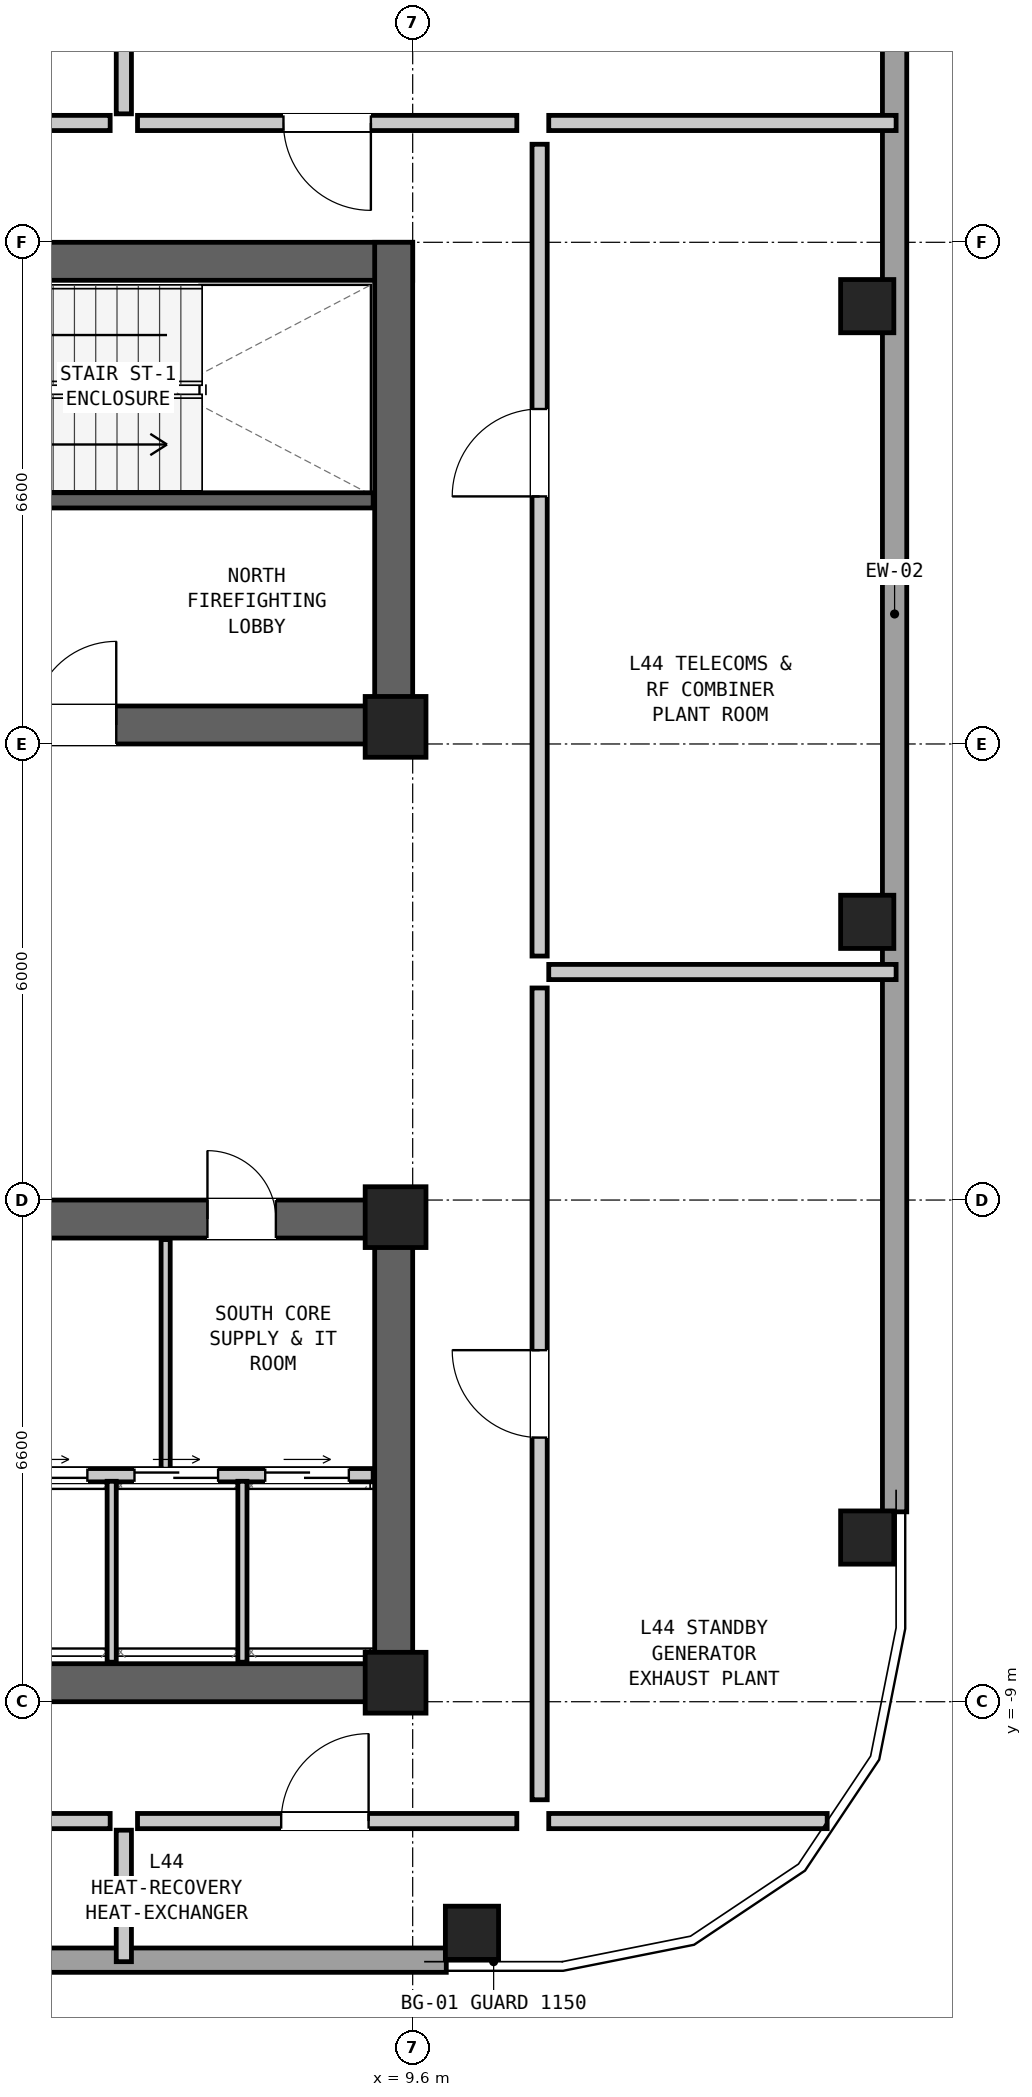
"""IFC4 building model, lengths in metres.
Left out: names, types, materials, properties, quantities, classifications, styles, units other than length and angle.
Written with IfcOpenShell. Run it as: python <this file> out.ifc"""

import sys

from ifc_helpers import new_model, si_unit, direction, frame, frame_2d, origin, origin_2d, place, context, subcontext, project, spatial, rectangle, hollow_rectangle, extrude, element, fill, save


model = new_model("IFC4")
c1 = context("Model", 3, precision=1e-05, world=origin(), true_north=direction((0.0, 1.0)))
c2 = subcontext(c1, "Body", "Model", "MODEL_VIEW")
j1 = project(units=[si_unit("LENGTHUNIT", "METRE"), si_unit("PLANEANGLEUNIT", "RADIAN")], contexts=[c1])
p1 = place(None, origin())
s1 = spatial("IfcSite", under=j1, at=p1, CompositionType="ELEMENT")
p2 = place(p1, origin())
s2 = spatial("IfcBuilding", under=s1, at=p2, CompositionType="ELEMENT")
p3 = place(p2, frame((0.0, 0.0, 151.8)))
s3 = spatial("IfcBuildingStorey", under=s2, at=p3, CompositionType="ELEMENT", Elevation=151.8)
p4 = place(p3, frame((-9.6, 9.95, 0.0), z_axis=(0.0, 0.0, 1.0), x_axis=(1.0, 0.0, 0.0)))
e1 = element("IfcWall", 1, at=p4, inside=s3, PredefinedType="SHEAR", context=c2, shape_type="SweptSolid", body=[
    extrude(rectangle(XDim=19.2, YDim=0.5, at=frame_2d((9.6, 0.0))), origin(), (0.0, 0.0, 1.0), 4.35),
])
p5 = place(p3, frame((-9.6, 3.85, 0.0), z_axis=(0.0, 0.0, 1.0), x_axis=(1.0, 0.0, 0.0)))
e2 = element("IfcWall", 2, at=p5, inside=s3, PredefinedType="SHEAR", context=c2, shape_type="SweptSolid", body=[
    extrude(rectangle(XDim=19.2, YDim=0.5, at=frame_2d((9.6, 0.0))), origin(), (0.0, 0.0, 1.0), 4.35),
])
p6 = place(p5, frame((14.2, 0.0, 0.0)))
e3 = element("IfcOpeningElement", 3, at=p6, cuts=e2, PredefinedType="OPENING", context=c2, shape_type="SweptSolid", body=[
    extrude(rectangle(XDim=1.1, YDim=2.08, at=frame_2d((0.55, 1.04))), frame((0.0, 0.262, 0.0), z_axis=(0.0, -1.0, 0.0), x_axis=(1.0, 0.0, 0.0)), (0.0, 0.0, 1.0), 0.524),
])
p7 = place(p5, frame((8.2, 0.0, 0.0)))
e4 = element("IfcOpeningElement", 4, at=p7, cuts=e2, PredefinedType="OPENING", context=c2, shape_type="SweptSolid", body=[
    extrude(rectangle(XDim=1.15, YDim=2.1, at=frame_2d((0.575, 1.05))), frame((0.0, 0.262, 0.0), z_axis=(0.0, -1.0, 0.0), x_axis=(1.0, 0.0, 0.0)), (0.0, 0.0, 1.0), 0.524),
])
p8 = place(p5, frame((2.5, 0.0, 0.0)))
e5 = element("IfcOpeningElement", 5, at=p8, cuts=e2, PredefinedType="OPENING", context=c2, shape_type="SweptSolid", body=[
    extrude(rectangle(XDim=1.6, YDim=2.12, at=frame_2d((0.8, 1.06))), frame((0.0, 0.262, 0.0), z_axis=(0.0, -1.0, 0.0), x_axis=(1.0, 0.0, 0.0)), (0.0, 0.0, 1.0), 0.524),
])
p9 = place(p3, frame((9.35, 3.6, 0.0), z_axis=(0.0, 0.0, 1.0), x_axis=(0.0, 1.0, 0.0)))
e6 = element("IfcWall", 6, at=p9, inside=s3, PredefinedType="SHEAR", context=c2, shape_type="SweptSolid", body=[
    extrude(rectangle(XDim=6.6, YDim=0.5, at=frame_2d((3.3, 0.0))), origin(), (0.0, 0.0, 1.0), 4.35),
])
p10 = place(p3, frame((-9.6, -8.75, 0.0), z_axis=(0.0, 0.0, 1.0), x_axis=(1.0, 0.0, 0.0)))
e7 = element("IfcWall", 7, at=p10, inside=s3, PredefinedType="SHEAR", context=c2, shape_type="SweptSolid", body=[
    extrude(rectangle(XDim=19.2, YDim=0.5, at=frame_2d((9.6, 0.0))), origin(), (0.0, 0.0, 1.0), 4.35),
])
p11 = place(p3, frame((-9.6, -2.65, 0.0), z_axis=(0.0, 0.0, 1.0), x_axis=(1.0, 0.0, 0.0)))
e8 = element("IfcWall", 8, at=p11, inside=s3, PredefinedType="SHEAR", context=c2, shape_type="SweptSolid", body=[
    extrude(rectangle(XDim=19.2, YDim=0.5, at=frame_2d((9.6, 0.0))), origin(), (0.0, 0.0, 1.0), 4.35),
])
p12 = place(p11, frame((3.8, 0.0, 0.0)))
e9 = element("IfcOpeningElement", 9, at=p12, cuts=e8, PredefinedType="OPENING", context=c2, shape_type="SweptSolid", body=[
    extrude(rectangle(XDim=1.1, YDim=2.08, at=frame_2d((0.55, 1.04))), frame((0.0, 0.262, 0.0), z_axis=(0.0, -1.0, 0.0), x_axis=(1.0, 0.0, 0.0)), (0.0, 0.0, 1.0), 0.524),
])
p13 = place(p11, frame((12.2, 0.0, 0.0)))
e10 = element("IfcOpeningElement", 10, at=p13, cuts=e8, PredefinedType="OPENING", context=c2, shape_type="SweptSolid", body=[
    extrude(rectangle(XDim=1.6, YDim=2.12, at=frame_2d((0.8, 1.06))), frame((0.0, 0.262, 0.0), z_axis=(0.0, -1.0, 0.0), x_axis=(1.0, 0.0, 0.0)), (0.0, 0.0, 1.0), 0.524),
])
p14 = place(p11, frame((16.5, 0.0, 0.0)))
e11 = element("IfcOpeningElement", 11, at=p14, cuts=e8, PredefinedType="OPENING", context=c2, shape_type="SweptSolid", body=[
    extrude(rectangle(XDim=0.9, YDim=2.05, at=frame_2d((0.45, 1.025))), frame((0.0, 0.262, 0.0), z_axis=(0.0, -1.0, 0.0), x_axis=(1.0, 0.0, 0.0)), (0.0, 0.0, 1.0), 0.524),
])
p15 = place(p3, frame((9.35, -9.0, 0.0), z_axis=(0.0, 0.0, 1.0), x_axis=(0.0, 1.0, 0.0)))
e12 = element("IfcWall", 12, at=p15, inside=s3, PredefinedType="SHEAR", context=c2, shape_type="SweptSolid", body=[
    extrude(rectangle(XDim=6.6, YDim=0.5, at=frame_2d((3.3, 0.0))), origin(), (0.0, 0.0, 1.0), 4.35),
])
for number, where, z_axis, x_axis in (
    (13, (10.38, -12.04, 0.0), (0.0, 0.0, 1.0), (1.0, 0.0, 0.0)),
    (14, (15.58, -6.84, 0.0), (0.0, 0.0, 1.0), (0.0, 1.0, 0.0)),
    (15, (15.58, 1.26, 0.0), (0.0, 0.0, 1.0), (0.0, 1.0, 0.0)),
    (16, (15.58, 9.36, 0.0), (0.0, 0.0, 1.0), (0.0, 1.0, 0.0)),
):
    element("IfcColumn", number, at=place(p3, frame(where, z_axis=z_axis, x_axis=x_axis)), inside=s3, PredefinedType="COLUMN", context=c2, shape_type="SweptSolid", body=[
        extrude(hollow_rectangle(XDim=0.7, YDim=0.7, WallThickness=0.045, at=origin_2d()), origin(), (0.0, 0.0, 1.0), 4.35),
    ])
for number, where, z_axis, x_axis in (
    (17, (9.375, 3.825, 0.0), (0.0, 0.0, 1.0), (1.0, 0.0, 0.0)),
    (18, (9.375, -2.625, 0.0), (0.0, 0.0, 1.0), (1.0, 0.0, 0.0)),
    (19, (9.375, -8.75, 0.0), (0.0, 0.0, 1.0), (1.0, 0.0, 0.0)),
):
    element("IfcColumn", number, at=place(p3, frame(where, z_axis=z_axis, x_axis=x_axis)), inside=s3, PredefinedType="COLUMN", context=c2, shape_type="SweptSolid", body=[
        extrude(rectangle(XDim=0.8, YDim=0.8, at=origin_2d()), origin(), (0.0, 0.0, 1.0), 4.35),
    ])
for number, where, z_axis, x_axis in (
    (20, (10.042, -12.4, 0.0), (0.0, 0.0, 1.0), (-1.0, 0.0, 0.0)),
    (21, (15.94, 17.122, 0.0), (0.0, 0.0, 1.0), (0.0, -1.0, 0.0)),
):
    element("IfcWall", number, at=place(p3, frame(where, z_axis=z_axis, x_axis=x_axis)), inside=s3, PredefinedType="SOLIDWALL", context=c2, shape_type="SweptSolid", body=[
        extrude(rectangle(XDim=23.624, YDim=0.32, at=frame_2d((11.812, 0.0))), origin(), (0.0, 0.0, 1.0), 2.31),
    ])
p16 = place(p3, frame((2.36, 6.805, 0.0), z_axis=(0.0, 0.0, 1.0), x_axis=(1.0, 0.0, 0.0)))
e22 = element("IfcWall", 22, at=p16, inside=s3, PredefinedType="SHEAR", context=c2, shape_type="SweptSolid", body=[
    extrude(rectangle(XDim=6.72, YDim=0.2, at=frame_2d((3.36, 0.0))), origin(), (0.0, 0.0, 1.0), 4.13),
])
p17 = place(p16, frame((0.3, 0.0, 0.0)))
e23 = element("IfcOpeningElement", 23, at=p17, cuts=e22, PredefinedType="OPENING", context=c2, shape_type="SweptSolid", body=[
    extrude(rectangle(XDim=1.05, YDim=2.08, at=frame_2d((0.525, 1.04))), frame((0.0, 0.112, 0.0), z_axis=(0.0, -1.0, 0.0), x_axis=(1.0, 0.0, 0.0)), (0.0, 0.0, 1.0), 0.224),
])
p18 = place(p3, frame((0.0, -6.02, 0.0), z_axis=(0.0, 0.0, 1.0), x_axis=(1.0, 0.0, 0.0)))
e24 = element("IfcWall", 24, at=p18, inside=s3, PredefinedType="PARTITIONING", context=c2, shape_type="SweptSolid", body=[
    extrude(rectangle(XDim=9.08, YDim=0.175, at=frame_2d((4.54, 0.0))), origin(), (0.0, 0.0, 1.0), 4.13),
])
p19 = place(p18, frame((0.33, 0.0, 0.0)))
e25 = element("IfcOpeningElement", 25, at=p19, cuts=e24, PredefinedType="OPENING", context=c2, shape_type="SweptSolid", body=[
    extrude(rectangle(XDim=1.1, YDim=2.06, at=frame_2d((0.55, 1.03))), frame((0.0, 0.1, 0.0), z_axis=(0.0, -1.0, 0.0), x_axis=(1.0, 0.0, 0.0)), (0.0, 0.0, 1.0), 0.199),
])
p20 = place(p18, frame((2.3, 0.0, 0.0)))
e26 = element("IfcOpeningElement", 26, at=p20, cuts=e24, PredefinedType="OPENING", context=c2, shape_type="SweptSolid", body=[
    extrude(rectangle(XDim=1.1, YDim=2.06, at=frame_2d((0.55, 1.03))), frame((0.0, 0.1, 0.0), z_axis=(0.0, -1.0, 0.0), x_axis=(1.0, 0.0, 0.0)), (0.0, 0.0, 1.0), 0.199),
])
p21 = place(p18, frame((4.22, 0.0, 0.0)))
e27 = element("IfcOpeningElement", 27, at=p21, cuts=e24, PredefinedType="OPENING", context=c2, shape_type="SweptSolid", body=[
    extrude(rectangle(XDim=1.1, YDim=2.06, at=frame_2d((0.55, 1.03))), frame((0.0, 0.1, 0.0), z_axis=(0.0, -1.0, 0.0), x_axis=(1.0, 0.0, 0.0)), (0.0, 0.0, 1.0), 0.199),
])
p22 = place(p18, frame((5.94, 0.0, 0.0)))
e28 = element("IfcOpeningElement", 28, at=p22, cuts=e24, PredefinedType="OPENING", context=c2, shape_type="SweptSolid", body=[
    extrude(rectangle(XDim=1.1, YDim=2.06, at=frame_2d((0.55, 1.03))), frame((0.0, 0.1, 0.0), z_axis=(0.0, -1.0, 0.0), x_axis=(1.0, 0.0, 0.0)), (0.0, 0.0, 1.0), 0.199),
])
p23 = place(p18, frame((7.66, 0.0, 0.0)))
e29 = element("IfcOpeningElement", 29, at=p23, cuts=e24, PredefinedType="OPENING", context=c2, shape_type="SweptSolid", body=[
    extrude(rectangle(XDim=1.1, YDim=2.06, at=frame_2d((0.55, 1.03))), frame((0.0, 0.1, 0.0), z_axis=(0.0, -1.0, 0.0), x_axis=(1.0, 0.0, 0.0)), (0.0, 0.0, 1.0), 0.199),
])
for number, where, z_axis, x_axis in (
    (30, (5.64, -8.48, 0.0), (0.0, 0.0, 1.0), (0.0, 1.0, 0.0)),
    (31, (7.36, -8.48, 0.0), (0.0, 0.0, 1.0), (0.0, 1.0, 0.0)),
):
    element("IfcWall", number, at=place(p3, frame(where, z_axis=z_axis, x_axis=x_axis)), inside=s3, PredefinedType="PARTITIONING", context=c2, shape_type="SweptSolid", body=[
        extrude(rectangle(XDim=2.38, YDim=0.12, at=frame_2d((1.19, 0.0))), origin(), (0.0, 0.0, 1.0), 4.13),
    ])
p24 = place(p3, frame((6.35, -5.94, 0.0), z_axis=(0.0, 0.0, 1.0), x_axis=(0.0, 1.0, 0.0)))
e32 = element("IfcWall", 32, at=p24, inside=s3, PredefinedType="PARTITIONING", context=c2, shape_type="SweptSolid", body=[
    extrude(rectangle(XDim=3.02, YDim=0.12, at=frame_2d((1.51, 0.0))), origin(), (0.0, 0.0, 1.0), 4.13),
])
p25 = place(p3, frame((5.62, 11.77, 0.0), z_axis=(0.0, 0.0, 1.0), x_axis=(-1.0, 0.0, 0.0)))
e33 = element("IfcWall", 33, at=p25, inside=s3, PredefinedType="PARTITIONING", context=c2, shape_type="SweptSolid", body=[
    extrude(rectangle(XDim=5.09, YDim=0.2, at=frame_2d((2.545, 0.0))), origin(), (0.0, 0.0, 1.0), 4.13),
])
p26 = place(p25, frame((1.97, 0.0, 0.0)))
e34 = element("IfcOpeningElement", 34, at=p26, cuts=e33, PredefinedType="OPENING", context=c2, shape_type="SweptSolid", body=[
    extrude(rectangle(XDim=1.15, YDim=2.1, at=frame_2d((0.575, 1.05))), frame((0.0, 0.112, 0.0), z_axis=(0.0, -1.0, 0.0), x_axis=(1.0, 0.0, 0.0)), (0.0, 0.0, 1.0), 0.224),
])
p27 = place(p3, frame((5.8, 11.89, 0.0), z_axis=(0.0, 0.0, 1.0), x_axis=(0.0, 1.0, 0.0)))
e35 = element("IfcWall", 35, at=p27, inside=s3, PredefinedType="PARTITIONING", context=c2, shape_type="SweptSolid", body=[
    extrude(rectangle(XDim=11.15, YDim=0.2, at=frame_2d((5.575, 0.0))), origin(), (0.0, 0.0, 1.0), 3.647),
])
p28 = place(p3, frame((10.97, 11.77, 0.0), z_axis=(0.0, 0.0, 1.0), x_axis=(-1.0, 0.0, 0.0)))
e36 = element("IfcWall", 36, at=p28, inside=s3, PredefinedType="PARTITIONING", context=c2, shape_type="SweptSolid", body=[
    extrude(rectangle(XDim=4.99, YDim=0.2, at=frame_2d((2.495, 0.0))), origin(), (0.0, 0.0, 1.0), 4.13),
])
p29 = place(p28, frame((1.92, 0.0, 0.0)))
e37 = element("IfcOpeningElement", 37, at=p29, cuts=e36, PredefinedType="OPENING", context=c2, shape_type="SweptSolid", body=[
    extrude(rectangle(XDim=1.15, YDim=2.1, at=frame_2d((0.575, 1.05))), frame((0.0, 0.112, 0.0), z_axis=(0.0, -1.0, 0.0), x_axis=(1.0, 0.0, 0.0)), (0.0, 0.0, 1.0), 0.224),
])
p30 = place(p3, frame((0.53, -10.57, 0.0), z_axis=(0.0, 0.0, 1.0), x_axis=(1.0, 0.0, 0.0)))
e38 = element("IfcWall", 38, at=p30, inside=s3, PredefinedType="PARTITIONING", context=c2, shape_type="SweptSolid", body=[
    extrude(rectangle(XDim=5.09, YDim=0.2, at=frame_2d((2.545, 0.0))), origin(), (0.0, 0.0, 1.0), 4.13),
])
p31 = place(p30, frame((2.37, 0.0, 0.0)))
e39 = element("IfcOpeningElement", 39, at=p31, cuts=e38, PredefinedType="OPENING", context=c2, shape_type="SweptSolid", body=[
    extrude(rectangle(XDim=1.15, YDim=2.1, at=frame_2d((0.575, 1.05))), frame((0.0, 0.112, 0.0), z_axis=(0.0, -1.0, 0.0), x_axis=(1.0, 0.0, 0.0)), (0.0, 0.0, 1.0), 0.224),
])
p32 = place(p3, frame((5.8, -12.42, 0.0), z_axis=(0.0, 0.0, 1.0), x_axis=(0.0, 1.0, 0.0)))
e40 = element("IfcWall", 40, at=p32, inside=s3, PredefinedType="PARTITIONING", context=c2, shape_type="SweptSolid", body=[
    extrude(rectangle(XDim=1.73, YDim=0.2, at=frame_2d((0.865, 0.0))), origin(), (0.0, 0.0, 1.0), 3.647),
])
p33 = place(p3, frame((5.98, -10.57, 0.0), z_axis=(0.0, 0.0, 1.0), x_axis=(1.0, 0.0, 0.0)))
e41 = element("IfcWall", 41, at=p33, inside=s3, PredefinedType="PARTITIONING", context=c2, shape_type="SweptSolid", body=[
    extrude(rectangle(XDim=4.99, YDim=0.2, at=frame_2d((2.495, 0.0))), origin(), (0.0, 0.0, 1.0), 4.13),
])
p34 = place(p33, frame((1.89, 0.0, 0.0)))
e42 = element("IfcOpeningElement", 42, at=p34, cuts=e41, PredefinedType="OPENING", context=c2, shape_type="SweptSolid", body=[
    extrude(rectangle(XDim=1.15, YDim=2.1, at=frame_2d((0.575, 1.05))), frame((0.0, 0.112, 0.0), z_axis=(0.0, -1.0, 0.0), x_axis=(1.0, 0.0, 0.0)), (0.0, 0.0, 1.0), 0.224),
])
p35 = place(p3, frame((11.39, 11.77, 0.0), z_axis=(0.0, 0.0, 1.0), x_axis=(1.0, 0.0, 0.0)))
e43 = element("IfcWall", 43, at=p35, inside=s3, PredefinedType="PARTITIONING", context=c2, shape_type="SweptSolid", body=[
    extrude(rectangle(XDim=4.57, YDim=0.2, at=frame_2d((2.285, 0.0))), origin(), (0.0, 0.0, 1.0), 4.13),
])
p36 = place(p3, frame((11.39, -10.57, 0.0), z_axis=(0.0, 0.0, 1.0), x_axis=(1.0, 0.0, 0.0)))
e44 = element("IfcWall", 44, at=p36, inside=s3, PredefinedType="PARTITIONING", context=c2, shape_type="SweptSolid", body=[
    extrude(rectangle(XDim=3.663, YDim=0.2, at=frame_2d((1.832, 0.0))), origin(), (0.0, 0.0, 1.0), 4.13),
])
p37 = place(p3, frame((11.39, 0.6, 0.0), z_axis=(0.0, 0.0, 1.0), x_axis=(1.0, 0.0, 0.0)))
e45 = element("IfcWall", 45, at=p37, inside=s3, PredefinedType="PARTITIONING", context=c2, shape_type="SweptSolid", body=[
    extrude(rectangle(XDim=4.57, YDim=0.2, at=frame_2d((2.285, 0.0))), origin(), (0.0, 0.0, 1.0), 2.31),
])
p38 = place(p3, frame((11.27, -10.29, 0.0), z_axis=(0.0, 0.0, 1.0), x_axis=(0.0, 1.0, 0.0)))
e46 = element("IfcWall", 46, at=p38, inside=s3, PredefinedType="PARTITIONING", context=c2, shape_type="SweptSolid", body=[
    extrude(rectangle(XDim=10.68, YDim=0.2, at=frame_2d((5.34, 0.0))), origin(), (0.0, 0.0, 1.0), 4.13),
])
p39 = place(p38, frame((4.765, 0.0, 0.0)))
e47 = element("IfcOpeningElement", 47, at=p39, cuts=e46, PredefinedType="OPENING", context=c2, shape_type="SweptSolid", body=[
    extrude(rectangle(XDim=1.15, YDim=2.1, at=frame_2d((0.575, 1.05))), frame((0.0, 0.112, 0.0), z_axis=(0.0, -1.0, 0.0), x_axis=(1.0, 0.0, 0.0)), (0.0, 0.0, 1.0), 0.224),
])
p40 = place(p3, frame((11.27, 0.81, 0.0), z_axis=(0.0, 0.0, 1.0), x_axis=(0.0, 1.0, 0.0)))
e48 = element("IfcWall", 48, at=p40, inside=s3, PredefinedType="PARTITIONING", context=c2, shape_type="SweptSolid", body=[
    extrude(rectangle(XDim=10.68, YDim=0.2, at=frame_2d((5.34, 0.0))), origin(), (0.0, 0.0, 1.0), 4.13),
])
p41 = place(p40, frame((6.047, 0.0, 0.0)))
e49 = element("IfcOpeningElement", 49, at=p41, cuts=e48, PredefinedType="OPENING", context=c2, shape_type="SweptSolid", body=[
    extrude(rectangle(XDim=1.15, YDim=2.1, at=frame_2d((0.575, 1.05))), frame((0.0, 0.112, 0.0), z_axis=(0.0, -1.0, 0.0), x_axis=(1.0, 0.0, 0.0)), (0.0, 0.0, 1.0), 0.224),
])
p42 = place(p6, origin())
e50 = element("IfcDoor", 50, at=p42, inside=s3, OperationType="SINGLE_SWING_RIGHT", PredefinedType="DOOR", context=c2, shape_type="SweptSolid", body=[
    extrude(rectangle(XDim=1.1, YDim=2.08, at=frame_2d((0.55, 1.04))), frame((0.0, 0.025, 0.0), z_axis=(0.0, -1.0, 0.0), x_axis=(1.0, 0.0, 0.0)), (0.0, 0.0, 1.0), 0.05),
])
fill(e3, e50)
p43 = place(p14, origin())
e51 = element("IfcDoor", 51, at=p43, inside=s3, OperationType="SINGLE_SWING_LEFT", PredefinedType="DOOR", context=c2, shape_type="SweptSolid", body=[
    extrude(rectangle(XDim=0.9, YDim=2.05, at=frame_2d((0.45, 1.025))), frame((0.0, 0.025, 0.0), z_axis=(0.0, -1.0, 0.0), x_axis=(1.0, 0.0, 0.0)), (0.0, 0.0, 1.0), 0.05),
])
fill(e11, e51)
p44 = place(p29, origin())
e52 = element("IfcDoor", 52, at=p44, inside=s3, OperationType="SINGLE_SWING_LEFT", PredefinedType="DOOR", context=c2, shape_type="SweptSolid", body=[
    extrude(rectangle(XDim=1.15, YDim=2.1, at=frame_2d((0.575, 1.05))), frame((0.0, 0.025, 0.0), z_axis=(0.0, -1.0, 0.0), x_axis=(1.0, 0.0, 0.0)), (0.0, 0.0, 1.0), 0.05),
])
fill(e37, e52)
p45 = place(p34, origin())
e53 = element("IfcDoor", 53, at=p45, inside=s3, OperationType="SINGLE_SWING_RIGHT", PredefinedType="DOOR", context=c2, shape_type="SweptSolid", body=[
    extrude(rectangle(XDim=1.15, YDim=2.1, at=frame_2d((0.575, 1.05))), frame((0.0, 0.025, 0.0), z_axis=(0.0, -1.0, 0.0), x_axis=(1.0, 0.0, 0.0)), (0.0, 0.0, 1.0), 0.05),
])
fill(e42, e53)
p46 = place(p39, origin())
e54 = element("IfcDoor", 54, at=p46, inside=s3, OperationType="SINGLE_SWING_RIGHT", PredefinedType="DOOR", context=c2, shape_type="SweptSolid", body=[
    extrude(rectangle(XDim=1.15, YDim=2.1, at=frame_2d((0.575, 1.05))), frame((0.0, 0.025, 0.0), z_axis=(0.0, -1.0, 0.0), x_axis=(1.0, 0.0, 0.0)), (0.0, 0.0, 1.0), 0.05),
])
fill(e47, e54)
p47 = place(p41, origin())
e55 = element("IfcDoor", 55, at=p47, inside=s3, OperationType="SINGLE_SWING_LEFT", PredefinedType="DOOR", context=c2, shape_type="SweptSolid", body=[
    extrude(rectangle(XDim=1.15, YDim=2.1, at=frame_2d((0.575, 1.05))), frame((0.0, 0.025, 0.0), z_axis=(0.0, -1.0, 0.0), x_axis=(1.0, 0.0, 0.0)), (0.0, 0.0, 1.0), 0.05),
])
fill(e49, e55)
p48 = place(p21, origin())
e56 = element("IfcDoor", 56, at=p48, inside=s3, OperationType="DOUBLE_DOOR_SLIDING", PredefinedType="DOOR", context=c2, shape_type="SweptSolid", body=[
    extrude(rectangle(XDim=1.1, YDim=2.06, at=frame_2d((0.55, 1.03))), frame((0.0, 0.025, 0.0), z_axis=(0.0, -1.0, 0.0), x_axis=(1.0, 0.0, 0.0)), (0.0, 0.0, 1.0), 0.05),
])
fill(e27, e56)
p49 = place(p22, origin())
e57 = element("IfcDoor", 57, at=p49, inside=s3, OperationType="DOUBLE_DOOR_SLIDING", PredefinedType="DOOR", context=c2, shape_type="SweptSolid", body=[
    extrude(rectangle(XDim=1.1, YDim=2.06, at=frame_2d((0.55, 1.03))), frame((0.0, 0.025, 0.0), z_axis=(0.0, -1.0, 0.0), x_axis=(1.0, 0.0, 0.0)), (0.0, 0.0, 1.0), 0.05),
])
fill(e28, e57)
p50 = place(p23, origin())
e58 = element("IfcDoor", 58, at=p50, inside=s3, OperationType="DOUBLE_DOOR_SLIDING", PredefinedType="DOOR", context=c2, shape_type="SweptSolid", body=[
    extrude(rectangle(XDim=1.1, YDim=2.06, at=frame_2d((0.55, 1.03))), frame((0.0, 0.025, 0.0), z_axis=(0.0, -1.0, 0.0), x_axis=(1.0, 0.0, 0.0)), (0.0, 0.0, 1.0), 0.05),
])
fill(e29, e58)
save(model, sys.argv[1])
